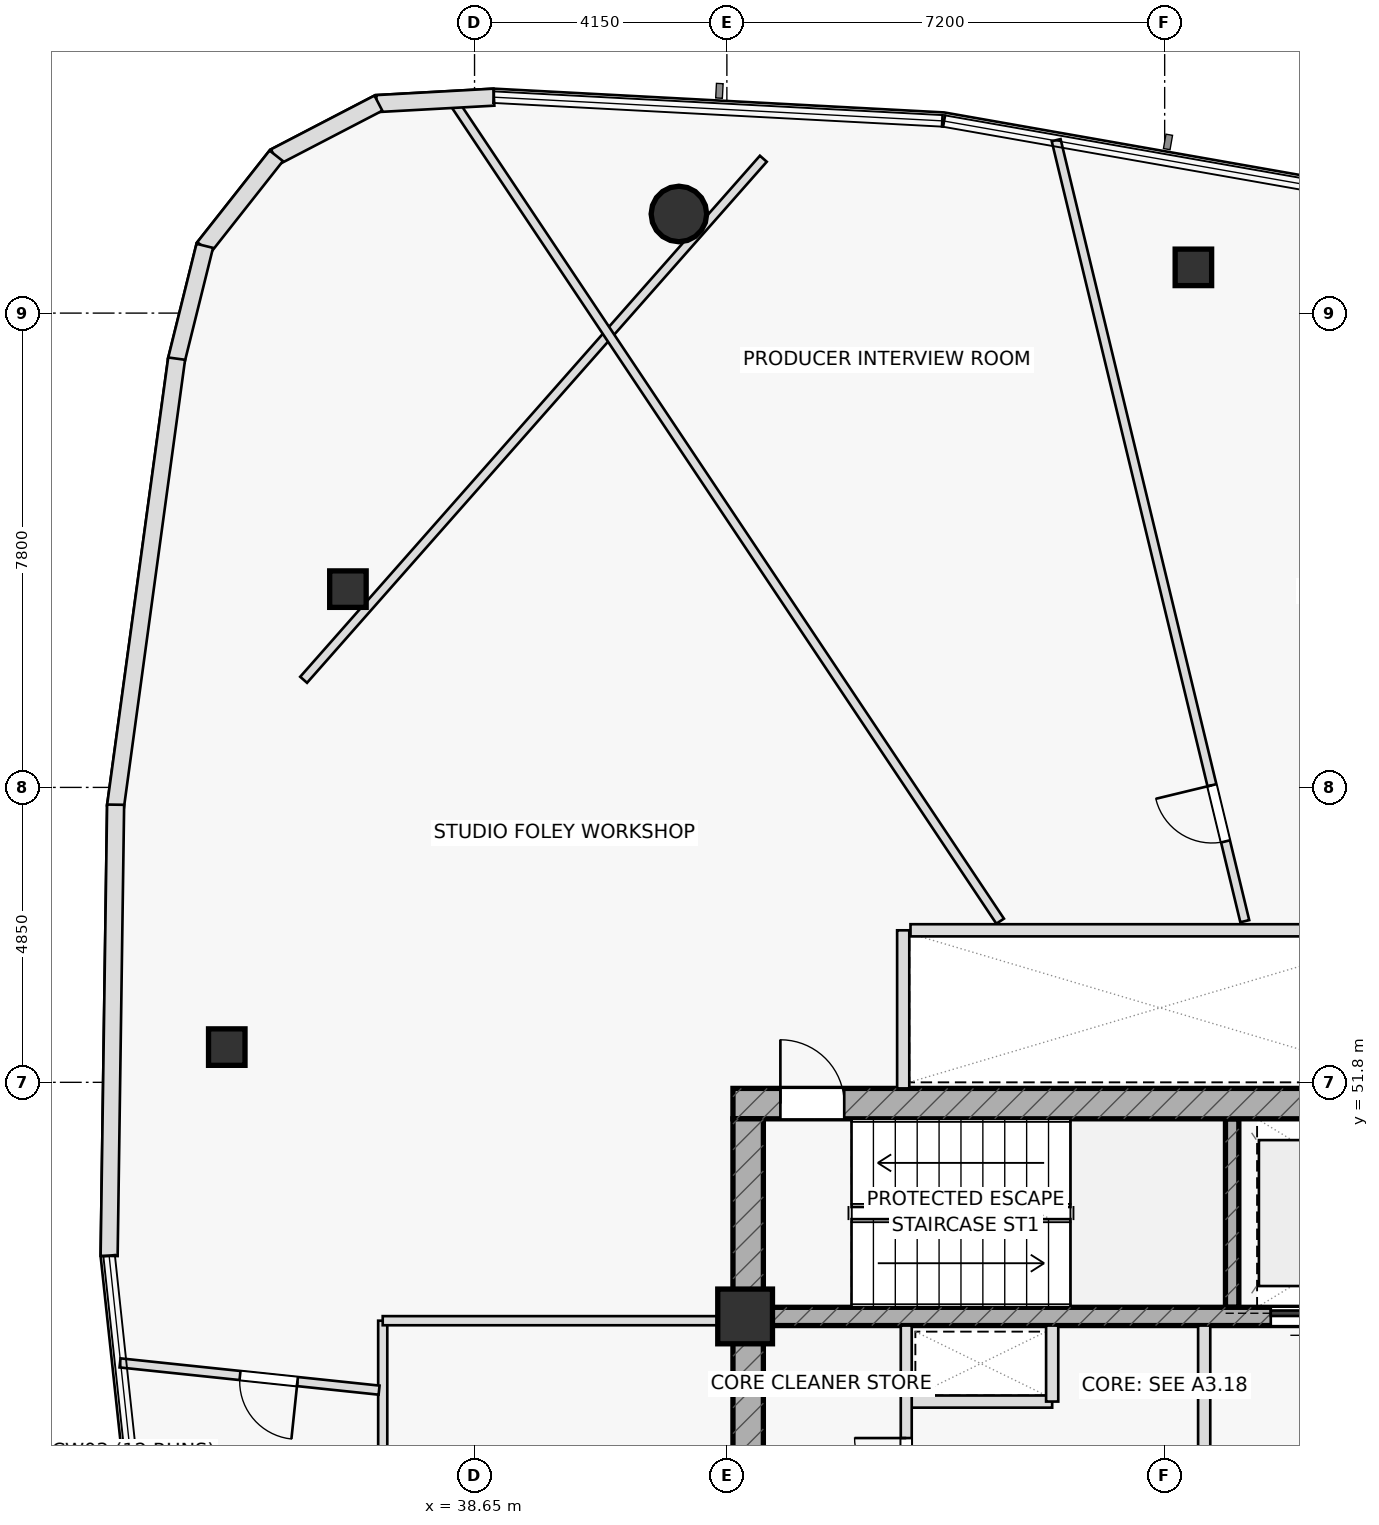
"""IFC4 building model, lengths in metres.
Left out: names, types, materials, properties, quantities, classifications, styles, units other than length and angle.
Written with IfcOpenShell. Run it as: python <this file> out.ifc"""

import sys

from ifc_helpers import new_model, si_unit, direction, frame, frame_2d, origin, origin_2d, place, context, subcontext, project, spatial, rectangle, hollow_rectangle, hollow_circle, extrude, element, fill, save


model = new_model("IFC4")
c1 = context("Model", 3, precision=1e-05, world=origin(), true_north=direction((0.0, 1.0)))
c2 = subcontext(c1, "Body", "Model", "MODEL_VIEW")
j1 = project(units=[si_unit("LENGTHUNIT", "METRE"), si_unit("PLANEANGLEUNIT", "RADIAN")], contexts=[c1])
p1 = place(None, origin())
s1 = spatial("IfcSite", under=j1, at=p1, CompositionType="ELEMENT")
p2 = place(p1, origin())
s2 = spatial("IfcBuilding", under=s1, at=p2, CompositionType="ELEMENT")
p3 = place(p2, frame((0.0, 0.0, 200.3)))
s3 = spatial("IfcBuildingStorey", under=s2, at=p3, CompositionType="ELEMENT", Elevation=200.3)
p4 = place(p3, frame((51.11, 48.1, 0.0), z_axis=(0.0, 0.0, 1.0), x_axis=(0.0, 1.0, 0.0)))
e1 = element("IfcWall", 1, at=p4, inside=s3, PredefinedType="SHEAR", context=c2, shape_type="SweptSolid", body=[
    extrude(rectangle(XDim=3.1, YDim=0.22, at=frame_2d((1.55, 0.0))), origin(), (0.0, 0.0, 1.0), 3.55),
])
p5 = place(p3, frame((42.9, 51.45, 0.0), z_axis=(0.0, 0.0, 1.0), x_axis=(1.0, 0.0, 0.0)))
e2 = element("IfcWall", 2, at=p5, inside=s3, PredefinedType="SHEAR", context=c2, shape_type="SweptSolid", body=[
    extrude(rectangle(XDim=14.2, YDim=0.5, at=frame_2d((7.1, 0.0))), origin(), (0.0, 0.0, 1.0), 3.55),
])
p6 = place(p5, frame((0.78, 0.0, 0.0)))
e3 = element("IfcOpeningElement", 3, at=p6, cuts=e2, PredefinedType="OPENING", context=c2, shape_type="SweptSolid", body=[
    extrude(rectangle(XDim=1.05, YDim=2.2, at=frame_2d((0.525, 1.1))), frame((0.0, 0.26, 0.0), z_axis=(0.0, -1.0, 0.0), x_axis=(1.0, 0.0, 0.0)), (0.0, 0.0, 1.0), 0.52),
])
p7 = place(p3, frame((43.15, 38.8, 0.0), z_axis=(0.0, 0.0, 1.0), x_axis=(0.0, 1.0, 0.0)))
e4 = element("IfcWall", 4, at=p7, inside=s3, PredefinedType="SHEAR", context=c2, shape_type="SweptSolid", body=[
    extrude(rectangle(XDim=12.4, YDim=0.5, at=frame_2d((6.2, 0.0))), origin(), (0.0, 0.0, 1.0), 3.55),
])
p8 = place(p3, frame((43.4, 47.95, 0.0), z_axis=(0.0, 0.0, 1.0), x_axis=(1.0, 0.0, 0.0)))
e5 = element("IfcWall", 5, at=p8, inside=s3, PredefinedType="SHEAR", context=c2, shape_type="SweptSolid", body=[
    extrude(rectangle(XDim=13.2, YDim=0.3, at=frame_2d((6.6, 0.0))), origin(), (0.0, 0.0, 1.0), 3.55),
])
p9 = place(p8, frame((8.345, 0.0, 0.0)))
e6 = element("IfcOpeningElement", 6, at=p9, cuts=e5, PredefinedType="OPENING", context=c2, shape_type="SweptSolid", body=[
    extrude(rectangle(XDim=1.15, YDim=2.2, at=frame_2d((0.575, 1.1))), frame((0.0, 0.16, 0.0), z_axis=(0.0, -1.0, 0.0), x_axis=(1.0, 0.0, 0.0)), (0.0, 0.0, 1.0), 0.32),
])
p10 = place(p8, frame((10.065, 0.0, 0.0)))
e7 = element("IfcOpeningElement", 7, at=p10, cuts=e5, PredefinedType="OPENING", context=c2, shape_type="SweptSolid", body=[
    extrude(rectangle(XDim=1.15, YDim=2.2, at=frame_2d((0.575, 1.1))), frame((0.0, 0.16, 0.0), z_axis=(0.0, -1.0, 0.0), x_axis=(1.0, 0.0, 0.0)), (0.0, 0.0, 1.0), 0.32),
])
p11 = place(p8, frame((11.645, 0.0, 0.0)))
e8 = element("IfcOpeningElement", 8, at=p11, cuts=e5, PredefinedType="OPENING", context=c2, shape_type="SweptSolid", body=[
    extrude(rectangle(XDim=1.15, YDim=2.2, at=frame_2d((0.575, 1.1))), frame((0.0, 0.16, 0.0), z_axis=(0.0, -1.0, 0.0), x_axis=(1.0, 0.0, 0.0)), (0.0, 0.0, 1.0), 0.32),
])
p12 = place(p3, frame((43.1, 47.95, 0.0), z_axis=(0.0, 0.0, 1.0), x_axis=(1.0, 0.0, 0.0)))
e9 = element("IfcColumn", 9, at=p12, inside=s3, PredefinedType="COLUMN", context=c2, shape_type="SweptSolid", body=[
    extrude(rectangle(XDim=0.9, YDim=0.9, at=origin_2d()), origin(), (0.0, 0.0, 1.0), 3.55),
])
p13 = place(p3, frame((42.011, 66.08, 0.0), z_axis=(0.0, 0.0, 1.0), x_axis=(1.0, 0.0, 0.0)))
e10 = element("IfcColumn", 10, at=p13, inside=s3, PredefinedType="COLUMN", context=c2, shape_type="SweptSolid", body=[
    extrude(hollow_circle(Radius=0.457, WallThickness=0.04, at=origin_2d()), origin(), (0.0, 0.0, 1.0), 3.55),
])
for number, where, z_axis, x_axis in (
    (11, (36.568, 59.911, 0.0), (0.0, 0.0, 1.0), (1.0, 0.0, 0.0)),
    (12, (34.575, 52.379, 0.0), (0.0, 0.0, 1.0), (1.0, 0.0, 0.0)),
    (13, (50.472, 65.202, 0.0), (0.0, 0.0, 1.0), (1.0, 0.0, 0.0)),
):
    element("IfcColumn", number, at=place(p3, frame(where, z_axis=z_axis, x_axis=x_axis)), inside=s3, PredefinedType="COLUMN", context=c2, shape_type="SweptSolid", body=[
        extrude(hollow_rectangle(XDim=0.6, YDim=0.6, WallThickness=0.036, at=origin_2d()), origin(), (0.0, 0.0, 1.0), 3.55),
    ])
p14 = place(p3, frame((45.7, 51.7, 0.0), z_axis=(0.0, 0.0, 1.0), x_axis=(0.0, 1.0, 0.0)))
e14 = element("IfcWall", 14, at=p14, inside=s3, PredefinedType="PARTITIONING", context=c2, shape_type="SweptSolid", body=[
    extrude(rectangle(XDim=2.6, YDim=0.2, at=frame_2d((1.3, 0.0))), origin(), (0.0, 0.0, 1.0), 3.55),
])
p15 = place(p3, frame((45.75, 46.55, 0.0), z_axis=(0.0, 0.0, 1.0), x_axis=(1.0, 0.0, 0.0)))
e15 = element("IfcWall", 15, at=p15, inside=s3, PredefinedType="PARTITIONING", context=c2, shape_type="SweptSolid", body=[
    extrude(rectangle(XDim=2.4, YDim=0.2, at=frame_2d((1.2, 0.0))), origin(), (0.0, 0.0, 1.0), 3.55),
])
p16 = place(p3, frame((48.15, 46.55, 0.0), z_axis=(0.0, 0.0, 1.0), x_axis=(0.0, 1.0, 0.0)))
e16 = element("IfcWall", 16, at=p16, inside=s3, PredefinedType="PARTITIONING", context=c2, shape_type="SweptSolid", body=[
    extrude(rectangle(XDim=1.25, YDim=0.2, at=frame_2d((0.625, 0.0))), origin(), (0.0, 0.0, 1.0), 3.55),
])
p17 = place(p3, frame((50.65, 45.05, 0.0), z_axis=(0.0, 0.0, 1.0), x_axis=(0.0, 1.0, 0.0)))
e17 = element("IfcWall", 17, at=p17, inside=s3, PredefinedType="PARTITIONING", context=c2, shape_type="SweptSolid", body=[
    extrude(rectangle(XDim=2.75, YDim=0.2, at=frame_2d((1.375, 0.0))), origin(), (0.0, 0.0, 1.0), 3.55),
])
p18 = place(p3, frame((45.75, 42.2, 0.0), z_axis=(0.0, 0.0, 1.0), x_axis=(0.0, 1.0, 0.0)))
e18 = element("IfcWall", 18, at=p18, inside=s3, PredefinedType="PARTITIONING", context=c2, shape_type="SweptSolid", body=[
    extrude(rectangle(XDim=5.6, YDim=0.18, at=frame_2d((2.8, 0.0))), origin(), (0.0, 0.0, 1.0), 3.55),
])
p19 = place(p18, frame((0.55, 0.0, 0.0)))
e19 = element("IfcOpeningElement", 19, at=p19, cuts=e18, PredefinedType="OPENING", context=c2, shape_type="SweptSolid", body=[
    extrude(rectangle(XDim=0.9, YDim=2.05, at=frame_2d((0.45, 1.025))), frame((0.0, 0.1, 0.0), z_axis=(0.0, -1.0, 0.0), x_axis=(1.0, 0.0, 0.0)), (0.0, 0.0, 1.0), 0.2),
])
p20 = place(p18, frame((2.9, 0.0, 0.0)))
e20 = element("IfcOpeningElement", 20, at=p20, cuts=e18, PredefinedType="OPENING", context=c2, shape_type="SweptSolid", body=[
    extrude(rectangle(XDim=0.85, YDim=2.05, at=frame_2d((0.425, 1.025))), frame((0.0, 0.1, 0.0), z_axis=(0.0, -1.0, 0.0), x_axis=(1.0, 0.0, 0.0)), (0.0, 0.0, 1.0), 0.2),
])
p21 = place(p3, frame((43.4, 66.989, 0.0), z_axis=(0.0, 0.0, 1.0), x_axis=(-0.661622343701, -0.749837231881, 0.0)))
e21 = element("IfcWall", 21, at=p21, inside=s3, PredefinedType="PARTITIONING", context=c2, shape_type="SweptSolid", body=[
    extrude(rectangle(XDim=11.427, YDim=0.15, at=frame_2d((5.714, 0.0))), origin(), (0.0, 0.0, 1.0), 2.935),
])
p22 = place(p3, frame((37.14, 40.3, 0.0), z_axis=(0.0, 0.0, 1.0), x_axis=(0.0, 1.0, 0.0)))
e22 = element("IfcWall", 22, at=p22, inside=s3, PredefinedType="PARTITIONING", context=c2, shape_type="SweptSolid", body=[
    extrude(rectangle(XDim=7.58, YDim=0.15, at=frame_2d((3.79, 0.0))), origin(), (0.0, 0.0, 1.0), 2.935),
])
p23 = place(p3, frame((37.14, 47.88, 0.0), z_axis=(0.0, 0.0, 1.0), x_axis=(1.0, 0.0, 0.0)))
e23 = element("IfcWall", 23, at=p23, inside=s3, PredefinedType="PARTITIONING", context=c2, shape_type="SweptSolid", body=[
    extrude(rectangle(XDim=5.76, YDim=0.15, at=frame_2d((2.88, 0.0))), origin(), (0.0, 0.0, 1.0), 2.935),
])
p24 = place(p3, frame((51.318, 54.45, 0.0), z_axis=(0.0, 0.0, 1.0), x_axis=(-0.234780806693, 0.97204833872, 0.0)))
e24 = element("IfcWall", 24, at=p24, inside=s3, PredefinedType="PARTITIONING", context=c2, shape_type="SweptSolid", body=[
    extrude(rectangle(XDim=13.214, YDim=0.15, at=frame_2d((6.607, 0.0))), origin(), (0.0, 0.0, 1.0), 3.025),
])
p25 = place(p24, frame((1.35, 0.0, 0.0)))
e25 = element("IfcOpeningElement", 25, at=p25, cuts=e24, PredefinedType="OPENING", context=c2, shape_type="SweptSolid", body=[
    extrude(rectangle(XDim=0.95, YDim=2.05, at=frame_2d((0.475, 1.025))), frame((0.0, 0.085, 0.0), z_axis=(0.0, -1.0, 0.0), x_axis=(1.0, 0.0, 0.0)), (0.0, 0.0, 1.0), 0.17),
])
p26 = place(p3, frame((47.294, 54.45, 0.0), z_axis=(0.0, 0.0, 1.0), x_axis=(-0.55503631466, 0.831826117292, 0.0)))
e26 = element("IfcWall", 26, at=p26, inside=s3, PredefinedType="PARTITIONING", context=c2, shape_type="SweptSolid", body=[
    extrude(rectangle(XDim=16.257, YDim=0.15, at=frame_2d((8.128, 0.0))), origin(), (0.0, 0.0, 1.0), 2.935),
])
p27 = place(p3, frame((37.08, 46.738, 0.0), z_axis=(0.0, 0.0, 1.0), x_axis=(-0.994511696143, 0.104625456917, 0.0)))
e27 = element("IfcWall", 27, at=p27, inside=s3, PredefinedType="PARTITIONING", context=c2, shape_type="SweptSolid", body=[
    extrude(rectangle(XDim=4.284, YDim=0.15, at=frame_2d((2.142, 0.0))), origin(), (0.0, 0.0, 1.0), 2.935),
])
p28 = place(p27, frame((1.35, 0.0, 0.0)))
e28 = element("IfcOpeningElement", 28, at=p28, cuts=e27, PredefinedType="OPENING", context=c2, shape_type="SweptSolid", body=[
    extrude(rectangle(XDim=0.95, YDim=2.05, at=frame_2d((0.475, 1.025))), frame((0.0, 0.085, 0.0), z_axis=(0.0, -1.0, 0.0), x_axis=(1.0, 0.0, 0.0)), (0.0, 0.0, 1.0), 0.17),
])
p29 = place(p3, frame((38.968, 68.001, 0.0), z_axis=(0.0, 0.0, 1.0), x_axis=(-0.998492863775, -0.054881699959, 0.0)))
e29 = element("IfcWall", 29, at=p29, inside=s3, PredefinedType="STANDARD", context=c2, shape_type="SweptSolid", body=[
    extrude(rectangle(XDim=1.931, YDim=0.28, at=frame_2d((0.965, 0.0))), origin(), (0.0, 0.0, 1.0), 3.55),
])
for number, where, z_axis, x_axis in (
    (30, (37.069, 67.903, 0.0), (0.0, 0.0, 1.0), (-0.887, -0.461, 0.0)),
    (31, (35.388, 67.037, 0.0), (0.0, 0.0, 1.0), (-0.619, -0.785, 0.0)),
):
    element("IfcWall", number, at=place(p3, frame(where, z_axis=z_axis, x_axis=x_axis)), inside=s3, PredefinedType="STANDARD", context=c2, shape_type="SweptSolid", body=[
        extrude(rectangle(XDim=1.919, YDim=0.28, at=frame_2d((0.959, 0.0))), origin(), (0.0, 0.0, 1.0), 3.55),
    ])
p30 = place(p3, frame((34.213, 65.556, 0.0), z_axis=(0.0, 0.0, 1.0), x_axis=(-0.241026558281, -0.970518520278, 0.0)))
e32 = element("IfcWall", 32, at=p30, inside=s3, PredefinedType="STANDARD", context=c2, shape_type="SweptSolid", body=[
    extrude(rectangle(XDim=1.942, YDim=0.28, at=frame_2d((0.971, 0.0))), origin(), (0.0, 0.0, 1.0), 3.55),
])
p31 = place(p3, frame((33.751, 63.701, 0.0), z_axis=(0.0, 0.0, 1.0), x_axis=(-0.135308121063, -0.990803569016, 0.0)))
e33 = element("IfcWall", 33, at=p31, inside=s3, PredefinedType="STANDARD", context=c2, shape_type="SweptSolid", body=[
    extrude(rectangle(XDim=7.434, YDim=0.28, at=frame_2d((3.717, 0.0))), origin(), (0.0, 0.0, 1.0), 3.55),
])
p32 = place(p3, frame((32.747, 56.366, 0.0), z_axis=(0.0, 0.0, 1.0), x_axis=(-0.014408294955, -0.999896195131, 0.0)))
e34 = element("IfcWall", 34, at=p32, inside=s3, PredefinedType="STANDARD", context=c2, shape_type="SweptSolid", body=[
    extrude(rectangle(XDim=7.422, YDim=0.28, at=frame_2d((3.711, 0.0))), origin(), (0.0, 0.0, 1.0), 3.55),
])
p33 = place(p3, frame((45.82, 54.3, 0.0), z_axis=(0.0, 0.0, 1.0), x_axis=(1.0, 0.0, 0.0)))
e35 = element("IfcWall", 35, at=p33, inside=s3, PredefinedType="PARTITIONING", context=c2, shape_type="SweptSolid", body=[
    extrude(rectangle(XDim=8.31, YDim=0.2, at=frame_2d((4.155, 0.0))), origin(), (0.0, 0.0, 1.0), 3.55),
])
p34 = place(p6, origin())
e36 = element("IfcDoor", 36, at=p34, inside=s3, OperationType="SINGLE_SWING_LEFT", PredefinedType="DOOR", context=c2, shape_type="SweptSolid", body=[
    extrude(rectangle(XDim=1.05, YDim=2.2, at=frame_2d((0.525, 1.1))), frame((0.0, 0.025, 0.0), z_axis=(0.0, -1.0, 0.0), x_axis=(1.0, 0.0, 0.0)), (0.0, 0.0, 1.0), 0.05),
])
fill(e3, e36)
p35 = place(p20, origin())
e37 = element("IfcDoor", 37, at=p35, inside=s3, OperationType="SINGLE_SWING_RIGHT", PredefinedType="DOOR", context=c2, shape_type="SweptSolid", body=[
    extrude(rectangle(XDim=0.85, YDim=2.05, at=frame_2d((0.425, 1.025))), frame((0.0, 0.025, 0.0), z_axis=(0.0, -1.0, 0.0), x_axis=(1.0, 0.0, 0.0)), (0.0, 0.0, 1.0), 0.05),
])
fill(e20, e37)
p36 = place(p25, origin())
e38 = element("IfcDoor", 38, at=p36, inside=s3, OperationType="SINGLE_SWING_RIGHT", PredefinedType="DOOR", context=c2, shape_type="SweptSolid", body=[
    extrude(rectangle(XDim=0.95, YDim=2.05, at=frame_2d((0.475, 1.025))), frame((0.0, 0.025, 0.0), z_axis=(0.0, -1.0, 0.0), x_axis=(1.0, 0.0, 0.0)), (0.0, 0.0, 1.0), 0.05),
])
fill(e25, e38)
p37 = place(p28, origin())
e39 = element("IfcDoor", 39, at=p37, inside=s3, OperationType="SINGLE_SWING_LEFT", PredefinedType="DOOR", context=c2, shape_type="SweptSolid", body=[
    extrude(rectangle(XDim=0.95, YDim=2.05, at=frame_2d((0.475, 1.025))), frame((0.0, 0.025, 0.0), z_axis=(0.0, -1.0, 0.0), x_axis=(1.0, 0.0, 0.0)), (0.0, 0.0, 1.0), 0.05),
])
fill(e28, e39)
p38 = place(p9, origin())
e40 = element("IfcDoor", 40, at=p38, inside=s3, OperationType="SLIDING_TO_LEFT", PredefinedType="DOOR", context=c2, shape_type="SweptSolid", body=[
    extrude(rectangle(XDim=1.15, YDim=2.2, at=frame_2d((0.575, 1.1))), frame((0.0, 0.025, 0.0), z_axis=(0.0, -1.0, 0.0), x_axis=(1.0, 0.0, 0.0)), (0.0, 0.0, 1.0), 0.05),
])
fill(e6, e40)
save(model, sys.argv[1])
